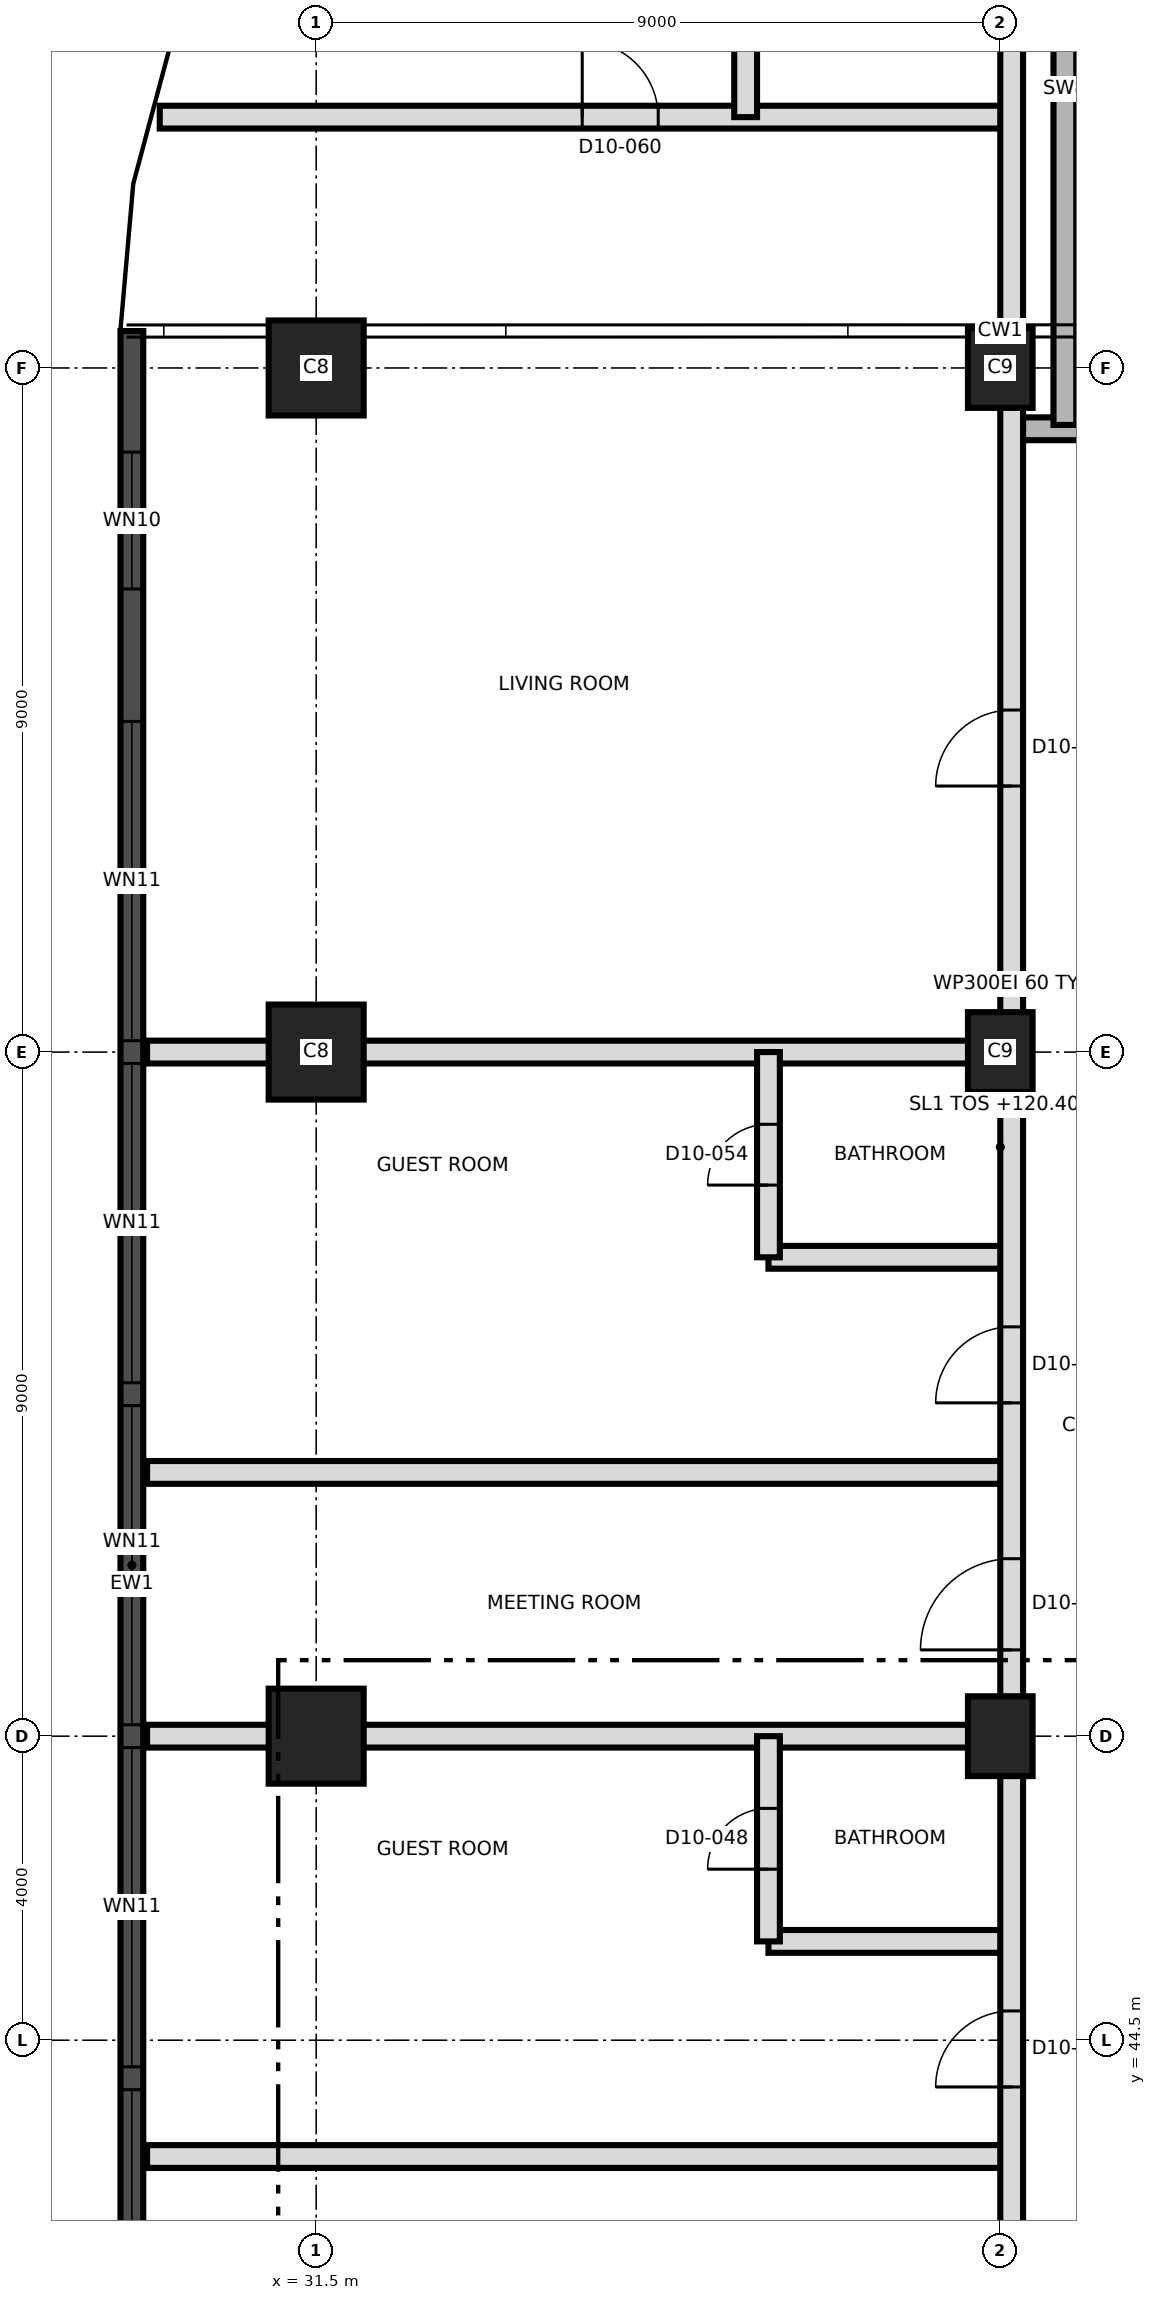
"""IFC4 building model, lengths in metres.
Left out: names, types, materials, properties, quantities, classifications, styles, units other than length and angle.
Written with IfcOpenShell. Run it as: python <this file> out.ifc"""

import sys

from ifc_helpers import new_model, si_unit, direction, frame, frame_2d, origin, origin_2d, place, context, subcontext, project, spatial, rectangle, extrude, element, fill, save


model = new_model("IFC4")
c1 = context("Model", 3, precision=1e-05, world=origin(), true_north=direction((0.0, 1.0)))
c2 = subcontext(c1, "Body", "Model", "MODEL_VIEW")
j1 = project(units=[si_unit("LENGTHUNIT", "METRE"), si_unit("PLANEANGLEUNIT", "RADIAN")], contexts=[c1])
p1 = place(None, origin())
s1 = spatial("IfcSite", under=j1, at=p1, CompositionType="ELEMENT")
p2 = place(p1, origin())
s2 = spatial("IfcBuilding", under=s1, at=p2, CompositionType="ELEMENT")
p3 = place(p2, frame((0.0, 0.0, 120.4)))
s3 = spatial("IfcBuildingStorey", under=s2, at=p3, CompositionType="ELEMENT", Elevation=120.4)
p4 = place(p3, frame((31.5, 48.5, 0.0), z_axis=(0.0, 0.0, 1.0), x_axis=(1.0, 0.0, 0.0)))
e1 = element("IfcColumn", 1, at=p4, inside=s3, PredefinedType="COLUMN", context=c2, shape_type="SweptSolid", body=[
    extrude(rectangle(XDim=1.25, YDim=1.25, at=origin_2d()), origin(), (0.0, 0.0, 1.0), 3.7),
])
p5 = place(p3, frame((40.5, 48.5, 0.0), z_axis=(0.0, 0.0, 1.0), x_axis=(0.0, 1.0, 0.0)))
e2 = element("IfcColumn", 2, at=p5, inside=s3, PredefinedType="COLUMN", context=c2, shape_type="SweptSolid", body=[
    extrude(rectangle(XDim=1.05, YDim=0.85, at=origin_2d()), origin(), (0.0, 0.0, 1.0), 3.7),
])
p6 = place(p3, frame((31.5, 57.5, 0.0), z_axis=(0.0, 0.0, 1.0), x_axis=(1.0, 0.0, 0.0)))
e3 = element("IfcColumn", 3, at=p6, inside=s3, PredefinedType="COLUMN", context=c2, shape_type="SweptSolid", body=[
    extrude(rectangle(XDim=1.25, YDim=1.25, at=origin_2d()), origin(), (0.0, 0.0, 1.0), 3.7),
])
p7 = place(p3, frame((40.5, 57.5, 0.0), z_axis=(0.0, 0.0, 1.0), x_axis=(0.0, 1.0, 0.0)))
e4 = element("IfcColumn", 4, at=p7, inside=s3, PredefinedType="COLUMN", context=c2, shape_type="SweptSolid", body=[
    extrude(rectangle(XDim=1.05, YDim=0.85, at=origin_2d()), origin(), (0.0, 0.0, 1.0), 3.7),
])
p8 = place(p3, frame((31.5, 66.5, 0.0), z_axis=(0.0, 0.0, 1.0), x_axis=(1.0, 0.0, 0.0)))
e5 = element("IfcColumn", 5, at=p8, inside=s3, PredefinedType="COLUMN", context=c2, shape_type="SweptSolid", body=[
    extrude(rectangle(XDim=1.25, YDim=1.25, at=origin_2d()), origin(), (0.0, 0.0, 1.0), 3.7),
])
p9 = place(p3, frame((40.5, 66.5, 0.0), z_axis=(0.0, 0.0, 1.0), x_axis=(0.0, 1.0, 0.0)))
e6 = element("IfcColumn", 6, at=p9, inside=s3, PredefinedType="COLUMN", context=c2, shape_type="SweptSolid", body=[
    extrude(rectangle(XDim=1.05, YDim=0.85, at=origin_2d()), origin(), (0.0, 0.0, 1.0), 3.7),
])
p10 = place(p3, frame((29.075, 66.986, 0.0), z_axis=(0.0, 0.0, 1.0), x_axis=(0.0, -1.0, 0.0)))
e7 = element("IfcWall", 7, at=p10, inside=s3, PredefinedType="SOLIDWALL", context=c2, shape_type="SweptSolid", body=[
    extrude(rectangle(XDim=32.976, YDim=0.3, at=frame_2d((16.488, 0.0))), origin(), (0.0, 0.0, 1.0), 3.4),
])
p11 = place(p10, frame((1.593, 0.0, 0.3)))
e8 = element("IfcOpeningElement", 8, at=p11, cuts=e7, PredefinedType="OPENING", context=c2, shape_type="SweptSolid", body=[
    extrude(rectangle(XDim=1.8, YDim=2.4, at=frame_2d((0.9, 1.2))), frame((0.0, 0.16, 0.0), z_axis=(0.0, -1.0, 0.0), x_axis=(1.0, 0.0, 0.0)), (0.0, 0.0, 1.0), 0.32),
])
p12 = place(p10, frame((5.136, 0.0, 0.9)))
e9 = element("IfcOpeningElement", 9, at=p12, cuts=e7, PredefinedType="OPENING", context=c2, shape_type="SweptSolid", body=[
    extrude(rectangle(XDim=4.2, YDim=1.5, at=frame_2d((2.1, 0.75))), frame((0.0, 0.16, 0.0), z_axis=(0.0, -1.0, 0.0), x_axis=(1.0, 0.0, 0.0)), (0.0, 0.0, 1.0), 0.32),
])
p13 = place(p10, frame((9.636, 0.0, 0.9)))
e10 = element("IfcOpeningElement", 10, at=p13, cuts=e7, PredefinedType="OPENING", context=c2, shape_type="SweptSolid", body=[
    extrude(rectangle(XDim=4.2, YDim=1.5, at=frame_2d((2.1, 0.75))), frame((0.0, 0.16, 0.0), z_axis=(0.0, -1.0, 0.0), x_axis=(1.0, 0.0, 0.0)), (0.0, 0.0, 1.0), 0.32),
])
p14 = place(p10, frame((14.136, 0.0, 0.9)))
e11 = element("IfcOpeningElement", 11, at=p14, cuts=e7, PredefinedType="OPENING", context=c2, shape_type="SweptSolid", body=[
    extrude(rectangle(XDim=4.2, YDim=1.5, at=frame_2d((2.1, 0.75))), frame((0.0, 0.16, 0.0), z_axis=(0.0, -1.0, 0.0), x_axis=(1.0, 0.0, 0.0)), (0.0, 0.0, 1.0), 0.32),
])
p15 = place(p10, frame((18.636, 0.0, 0.9)))
e12 = element("IfcOpeningElement", 12, at=p15, cuts=e7, PredefinedType="OPENING", context=c2, shape_type="SweptSolid", body=[
    extrude(rectangle(XDim=4.2, YDim=1.5, at=frame_2d((2.1, 0.75))), frame((0.0, 0.16, 0.0), z_axis=(0.0, -1.0, 0.0), x_axis=(1.0, 0.0, 0.0)), (0.0, 0.0, 1.0), 0.32),
])
p16 = place(p10, frame((23.136, 0.0, 0.9)))
e13 = element("IfcOpeningElement", 13, at=p16, cuts=e7, PredefinedType="OPENING", context=c2, shape_type="SweptSolid", body=[
    extrude(rectangle(XDim=4.2, YDim=1.5, at=frame_2d((2.1, 0.75))), frame((0.0, 0.16, 0.0), z_axis=(0.0, -1.0, 0.0), x_axis=(1.0, 0.0, 0.0)), (0.0, 0.0, 1.0), 0.32),
])
p17 = place(p10, frame((29.331, 0.0, 0.3)))
e14 = element("IfcOpeningElement", 14, at=p17, cuts=e7, PredefinedType="OPENING", context=c2, shape_type="SweptSolid", body=[
    extrude(rectangle(XDim=1.8, YDim=2.4, at=frame_2d((0.9, 1.2))), frame((0.0, 0.16, 0.0), z_axis=(0.0, -1.0, 0.0), x_axis=(1.0, 0.0, 0.0)), (0.0, 0.0, 1.0), 0.32),
])
p18 = place(p3, frame((29.275, 42.97, 0.0), z_axis=(0.0, 0.0, 1.0), x_axis=(1.0, 0.0, 0.0)))
e15 = element("IfcWall", 15, at=p18, inside=s3, PredefinedType="PARTITIONING", context=c2, shape_type="SweptSolid", body=[
    extrude(rectangle(XDim=11.375, YDim=0.3, at=frame_2d((5.688, 0.0))), origin(), (0.0, 0.0, 1.0), 3.35),
])
p19 = place(p3, frame((37.45, 45.8, 0.0), z_axis=(0.0, 0.0, 1.0), x_axis=(1.0, 0.0, 0.0)))
e16 = element("IfcWall", 16, at=p19, inside=s3, PredefinedType="PARTITIONING", context=c2, shape_type="SweptSolid", body=[
    extrude(rectangle(XDim=3.2, YDim=0.3, at=frame_2d((1.6, 0.0))), origin(), (0.0, 0.0, 1.0), 3.4),
])
for number, where, z_axis, x_axis in (
    (17, (29.275, 48.5, 0.0), (0.0, 0.0, 1.0), (1.0, 0.0, 0.0)),
    (18, (29.275, 51.97, 0.0), (0.0, 0.0, 1.0), (1.0, 0.0, 0.0)),
):
    element("IfcWall", number, at=place(p3, frame(where, z_axis=z_axis, x_axis=x_axis)), inside=s3, PredefinedType="PARTITIONING", context=c2, shape_type="SweptSolid", body=[
        extrude(rectangle(XDim=11.375, YDim=0.3, at=frame_2d((5.688, 0.0))), origin(), (0.0, 0.0, 1.0), 3.35),
    ])
p20 = place(p3, frame((37.45, 54.8, 0.0), z_axis=(0.0, 0.0, 1.0), x_axis=(1.0, 0.0, 0.0)))
e19 = element("IfcWall", 19, at=p20, inside=s3, PredefinedType="PARTITIONING", context=c2, shape_type="SweptSolid", body=[
    extrude(rectangle(XDim=3.2, YDim=0.3, at=frame_2d((1.6, 0.0))), origin(), (0.0, 0.0, 1.0), 3.4),
])
p21 = place(p3, frame((29.275, 57.5, 0.0), z_axis=(0.0, 0.0, 1.0), x_axis=(1.0, 0.0, 0.0)))
e20 = element("IfcWall", 20, at=p21, inside=s3, PredefinedType="PARTITIONING", context=c2, shape_type="SweptSolid", body=[
    extrude(rectangle(XDim=11.375, YDim=0.3, at=frame_2d((5.688, 0.0))), origin(), (0.0, 0.0, 1.0), 3.35),
])
p22 = place(p3, frame((40.65, 65.7, 0.0), z_axis=(0.0, 0.0, 1.0), x_axis=(1.0, 0.0, 0.0)))
e21 = element("IfcWall", 21, at=p22, inside=s3, PredefinedType="SHEAR", context=c2, shape_type="SweptSolid", body=[
    extrude(rectangle(XDim=6.2, YDim=0.3, at=frame_2d((3.1, 0.0))), origin(), (0.0, 0.0, 1.0), 3.4),
])
p23 = place(p22, frame((1.1, 0.0, 0.0)))
e22 = element("IfcOpeningElement", 22, at=p23, cuts=e21, PredefinedType="OPENING", context=c2, shape_type="SweptSolid", body=[
    extrude(rectangle(XDim=1.2, YDim=2.1, at=frame_2d((0.6, 1.05))), frame((0.0, 0.16, 0.0), z_axis=(0.0, -1.0, 0.0), x_axis=(1.0, 0.0, 0.0)), (0.0, 0.0, 1.0), 0.32),
])
p24 = place(p3, frame((29.442, 69.8, 0.0), z_axis=(0.0, 0.0, 1.0), x_axis=(1.0, 0.0, 0.0)))
e23 = element("IfcWall", 23, at=p24, inside=s3, PredefinedType="PARTITIONING", context=c2, shape_type="SweptSolid", body=[
    extrude(rectangle(XDim=11.208, YDim=0.3, at=frame_2d((5.604, 0.0))), origin(), (0.0, 0.0, 1.0), 3.35),
])
p25 = place(p24, frame((5.558, 0.0, 0.0)))
e24 = element("IfcOpeningElement", 24, at=p25, cuts=e23, PredefinedType="OPENING", context=c2, shape_type="SweptSolid", body=[
    extrude(rectangle(XDim=1.0, YDim=2.1, at=frame_2d((0.5, 1.05))), frame((0.0, 0.16, 0.0), z_axis=(0.0, -1.0, 0.0), x_axis=(1.0, 0.0, 0.0)), (0.0, 0.0, 1.0), 0.32),
])
p26 = place(p3, frame((37.15, 69.8, 0.0), z_axis=(0.0, 0.0, 1.0), x_axis=(0.0, 1.0, 0.0)))
e25 = element("IfcWall", 25, at=p26, inside=s3, PredefinedType="PARTITIONING", context=c2, shape_type="SweptSolid", body=[
    extrude(rectangle(XDim=3.3, YDim=0.3, at=frame_2d((1.65, 0.0))), origin(), (0.0, 0.0, 1.0), 3.4),
])
p27 = place(p26, frame((1.25, 0.0, 0.0)))
e26 = element("IfcOpeningElement", 26, at=p27, cuts=e25, PredefinedType="OPENING", context=c2, shape_type="SweptSolid", body=[
    extrude(rectangle(XDim=0.8, YDim=2.1, at=frame_2d((0.4, 1.05))), frame((0.0, 0.16, 0.0), z_axis=(0.0, -1.0, 0.0), x_axis=(1.0, 0.0, 0.0)), (0.0, 0.0, 1.0), 0.32),
])
p28 = place(p3, frame((37.45, 45.8, 0.0), z_axis=(0.0, 0.0, 1.0), x_axis=(0.0, 1.0, 0.0)))
e27 = element("IfcWall", 27, at=p28, inside=s3, PredefinedType="PARTITIONING", context=c2, shape_type="SweptSolid", body=[
    extrude(rectangle(XDim=2.7, YDim=0.3, at=frame_2d((1.35, 0.0))), origin(), (0.0, 0.0, 1.0), 3.4),
])
p29 = place(p28, frame((0.95, 0.0, 0.0)))
e28 = element("IfcOpeningElement", 28, at=p29, cuts=e27, PredefinedType="OPENING", context=c2, shape_type="SweptSolid", body=[
    extrude(rectangle(XDim=0.8, YDim=2.1, at=frame_2d((0.4, 1.05))), frame((0.0, 0.16, 0.0), z_axis=(0.0, -1.0, 0.0), x_axis=(1.0, 0.0, 0.0)), (0.0, 0.0, 1.0), 0.32),
])
p30 = place(p3, frame((37.45, 54.8, 0.0), z_axis=(0.0, 0.0, 1.0), x_axis=(0.0, 1.0, 0.0)))
e29 = element("IfcWall", 29, at=p30, inside=s3, PredefinedType="PARTITIONING", context=c2, shape_type="SweptSolid", body=[
    extrude(rectangle(XDim=2.7, YDim=0.3, at=frame_2d((1.35, 0.0))), origin(), (0.0, 0.0, 1.0), 3.4),
])
p31 = place(p30, frame((0.95, 0.0, 0.0)))
e30 = element("IfcOpeningElement", 30, at=p31, cuts=e29, PredefinedType="OPENING", context=c2, shape_type="SweptSolid", body=[
    extrude(rectangle(XDim=0.8, YDim=2.1, at=frame_2d((0.4, 1.05))), frame((0.0, 0.16, 0.0), z_axis=(0.0, -1.0, 0.0), x_axis=(1.0, 0.0, 0.0)), (0.0, 0.0, 1.0), 0.32),
])
p32 = place(p3, frame((40.65, 39.8, 0.0), z_axis=(0.0, 0.0, 1.0), x_axis=(0.0, 1.0, 0.0)))
e31 = element("IfcWall", 31, at=p32, inside=s3, PredefinedType="PARTITIONING", context=c2, shape_type="SweptSolid", body=[
    extrude(rectangle(XDim=37.2, YDim=0.3, at=frame_2d((18.6, 0.0))), origin(), (0.0, 0.0, 1.0), 3.35),
])
p33 = place(p32, frame((0.835, 0.0, 0.0)))
e32 = element("IfcOpeningElement", 32, at=p33, cuts=e31, PredefinedType="OPENING", context=c2, shape_type="SweptSolid", body=[
    extrude(rectangle(XDim=1.2, YDim=2.1, at=frame_2d((0.6, 1.05))), frame((0.0, 0.16, 0.0), z_axis=(0.0, -1.0, 0.0), x_axis=(1.0, 0.0, 0.0)), (0.0, 0.0, 1.0), 0.32),
])
p34 = place(p32, frame((4.085, 0.0, 0.0)))
e33 = element("IfcOpeningElement", 33, at=p34, cuts=e31, PredefinedType="OPENING", context=c2, shape_type="SweptSolid", body=[
    extrude(rectangle(XDim=1.0, YDim=2.1, at=frame_2d((0.5, 1.05))), frame((0.0, 0.16, 0.0), z_axis=(0.0, -1.0, 0.0), x_axis=(1.0, 0.0, 0.0)), (0.0, 0.0, 1.0), 0.32),
])
p35 = place(p32, frame((9.835, 0.0, 0.0)))
e34 = element("IfcOpeningElement", 34, at=p35, cuts=e31, PredefinedType="OPENING", context=c2, shape_type="SweptSolid", body=[
    extrude(rectangle(XDim=1.2, YDim=2.1, at=frame_2d((0.6, 1.05))), frame((0.0, 0.16, 0.0), z_axis=(0.0, -1.0, 0.0), x_axis=(1.0, 0.0, 0.0)), (0.0, 0.0, 1.0), 0.32),
])
p36 = place(p32, frame((13.085, 0.0, 0.0)))
e35 = element("IfcOpeningElement", 35, at=p36, cuts=e31, PredefinedType="OPENING", context=c2, shape_type="SweptSolid", body=[
    extrude(rectangle(XDim=1.0, YDim=2.1, at=frame_2d((0.5, 1.05))), frame((0.0, 0.16, 0.0), z_axis=(0.0, -1.0, 0.0), x_axis=(1.0, 0.0, 0.0)), (0.0, 0.0, 1.0), 0.32),
])
p37 = place(p32, frame((21.2, 0.0, 0.0)))
e36 = element("IfcOpeningElement", 36, at=p37, cuts=e31, PredefinedType="OPENING", context=c2, shape_type="SweptSolid", body=[
    extrude(rectangle(XDim=1.0, YDim=2.4, at=frame_2d((0.5, 1.2))), frame((0.0, 0.16, 0.0), z_axis=(0.0, -1.0, 0.0), x_axis=(1.0, 0.0, 0.0)), (0.0, 0.0, 1.0), 0.32),
])
p38 = place(p3, frame((41.35, 65.75, 0.0), z_axis=(0.0, 0.0, 1.0), x_axis=(0.0, 1.0, 0.0)))
e37 = element("IfcWall", 37, at=p38, inside=s3, PredefinedType="SHEAR", context=c2, shape_type="SweptSolid", body=[
    extrude(rectangle(XDim=8.85, YDim=0.3, at=frame_2d((4.425, 0.0))), origin(), (0.0, 0.0, 1.0), 3.4),
])
p39 = place(p11, origin())
e38 = element("IfcWindow", 38, at=p39, inside=s3, PartitioningType="SINGLE_PANEL", PredefinedType="WINDOW", context=c2, shape_type="SweptSolid", body=[
    extrude(rectangle(XDim=1.8, YDim=2.4, at=frame_2d((0.9, 1.2))), frame((0.0, 0.03, 0.0), z_axis=(0.0, -1.0, 0.0), x_axis=(1.0, 0.0, 0.0)), (0.0, 0.0, 1.0), 0.06),
])
fill(e8, e38)
p40 = place(p12, origin())
e39 = element("IfcWindow", 39, at=p40, inside=s3, PartitioningType="SINGLE_PANEL", PredefinedType="WINDOW", context=c2, shape_type="SweptSolid", body=[
    extrude(rectangle(XDim=4.2, YDim=1.5, at=frame_2d((2.1, 0.75))), frame((0.0, 0.03, 0.0), z_axis=(0.0, -1.0, 0.0), x_axis=(1.0, 0.0, 0.0)), (0.0, 0.0, 1.0), 0.06),
])
fill(e9, e39)
p41 = place(p13, origin())
e40 = element("IfcWindow", 40, at=p41, inside=s3, PartitioningType="SINGLE_PANEL", PredefinedType="WINDOW", context=c2, shape_type="SweptSolid", body=[
    extrude(rectangle(XDim=4.2, YDim=1.5, at=frame_2d((2.1, 0.75))), frame((0.0, 0.03, 0.0), z_axis=(0.0, -1.0, 0.0), x_axis=(1.0, 0.0, 0.0)), (0.0, 0.0, 1.0), 0.06),
])
fill(e10, e40)
p42 = place(p14, origin())
e41 = element("IfcWindow", 41, at=p42, inside=s3, PartitioningType="SINGLE_PANEL", PredefinedType="WINDOW", context=c2, shape_type="SweptSolid", body=[
    extrude(rectangle(XDim=4.2, YDim=1.5, at=frame_2d((2.1, 0.75))), frame((0.0, 0.03, 0.0), z_axis=(0.0, -1.0, 0.0), x_axis=(1.0, 0.0, 0.0)), (0.0, 0.0, 1.0), 0.06),
])
fill(e11, e41)
p43 = place(p15, origin())
e42 = element("IfcWindow", 42, at=p43, inside=s3, PartitioningType="SINGLE_PANEL", PredefinedType="WINDOW", context=c2, shape_type="SweptSolid", body=[
    extrude(rectangle(XDim=4.2, YDim=1.5, at=frame_2d((2.1, 0.75))), frame((0.0, 0.03, 0.0), z_axis=(0.0, -1.0, 0.0), x_axis=(1.0, 0.0, 0.0)), (0.0, 0.0, 1.0), 0.06),
])
fill(e12, e42)
p44 = place(p16, origin())
e43 = element("IfcWindow", 43, at=p44, inside=s3, PartitioningType="SINGLE_PANEL", PredefinedType="WINDOW", context=c2, shape_type="SweptSolid", body=[
    extrude(rectangle(XDim=4.2, YDim=1.5, at=frame_2d((2.1, 0.75))), frame((0.0, 0.03, 0.0), z_axis=(0.0, -1.0, 0.0), x_axis=(1.0, 0.0, 0.0)), (0.0, 0.0, 1.0), 0.06),
])
fill(e13, e43)
p45 = place(p29, origin())
e44 = element("IfcDoor", 44, at=p45, inside=s3, OperationType="SINGLE_SWING_RIGHT", PredefinedType="DOOR", context=c2, shape_type="SweptSolid", body=[
    extrude(rectangle(XDim=0.8, YDim=2.1, at=frame_2d((0.4, 1.05))), frame((0.0, 0.025, 0.0), z_axis=(0.0, -1.0, 0.0), x_axis=(1.0, 0.0, 0.0)), (0.0, 0.0, 1.0), 0.05),
])
fill(e28, e44)
p46 = place(p34, origin())
e45 = element("IfcDoor", 45, at=p46, inside=s3, OperationType="SINGLE_SWING_LEFT", PredefinedType="DOOR", context=c2, shape_type="SweptSolid", body=[
    extrude(rectangle(XDim=1.0, YDim=2.1, at=frame_2d((0.5, 1.05))), frame((0.0, 0.025, 0.0), z_axis=(0.0, -1.0, 0.0), x_axis=(1.0, 0.0, 0.0)), (0.0, 0.0, 1.0), 0.05),
])
fill(e33, e45)
p47 = place(p35, origin())
e46 = element("IfcDoor", 46, at=p47, inside=s3, OperationType="SINGLE_SWING_LEFT", PredefinedType="DOOR", context=c2, shape_type="SweptSolid", body=[
    extrude(rectangle(XDim=1.2, YDim=2.1, at=frame_2d((0.6, 1.05))), frame((0.0, 0.025, 0.0), z_axis=(0.0, -1.0, 0.0), x_axis=(1.0, 0.0, 0.0)), (0.0, 0.0, 1.0), 0.05),
])
fill(e34, e46)
p48 = place(p31, origin())
e47 = element("IfcDoor", 47, at=p48, inside=s3, OperationType="SINGLE_SWING_RIGHT", PredefinedType="DOOR", context=c2, shape_type="SweptSolid", body=[
    extrude(rectangle(XDim=0.8, YDim=2.1, at=frame_2d((0.4, 1.05))), frame((0.0, 0.025, 0.0), z_axis=(0.0, -1.0, 0.0), x_axis=(1.0, 0.0, 0.0)), (0.0, 0.0, 1.0), 0.05),
])
fill(e30, e47)
p49 = place(p36, origin())
e48 = element("IfcDoor", 48, at=p49, inside=s3, OperationType="SINGLE_SWING_LEFT", PredefinedType="DOOR", context=c2, shape_type="SweptSolid", body=[
    extrude(rectangle(XDim=1.0, YDim=2.1, at=frame_2d((0.5, 1.05))), frame((0.0, 0.025, 0.0), z_axis=(0.0, -1.0, 0.0), x_axis=(1.0, 0.0, 0.0)), (0.0, 0.0, 1.0), 0.05),
])
fill(e35, e48)
p50 = place(p37, origin())
e49 = element("IfcDoor", 49, at=p50, inside=s3, OperationType="SINGLE_SWING_LEFT", PredefinedType="DOOR", context=c2, shape_type="SweptSolid", body=[
    extrude(rectangle(XDim=1.0, YDim=2.4, at=frame_2d((0.5, 1.2))), frame((0.0, 0.025, 0.0), z_axis=(0.0, -1.0, 0.0), x_axis=(1.0, 0.0, 0.0)), (0.0, 0.0, 1.0), 0.05),
])
fill(e36, e49)
p51 = place(p25, origin())
e50 = element("IfcDoor", 50, at=p51, inside=s3, OperationType="SINGLE_SWING_LEFT", PredefinedType="DOOR", context=c2, shape_type="SweptSolid", body=[
    extrude(rectangle(XDim=1.0, YDim=2.1, at=frame_2d((0.5, 1.05))), frame((0.0, 0.025, 0.0), z_axis=(0.0, -1.0, 0.0), x_axis=(1.0, 0.0, 0.0)), (0.0, 0.0, 1.0), 0.05),
])
fill(e24, e50)
save(model, sys.argv[1])
